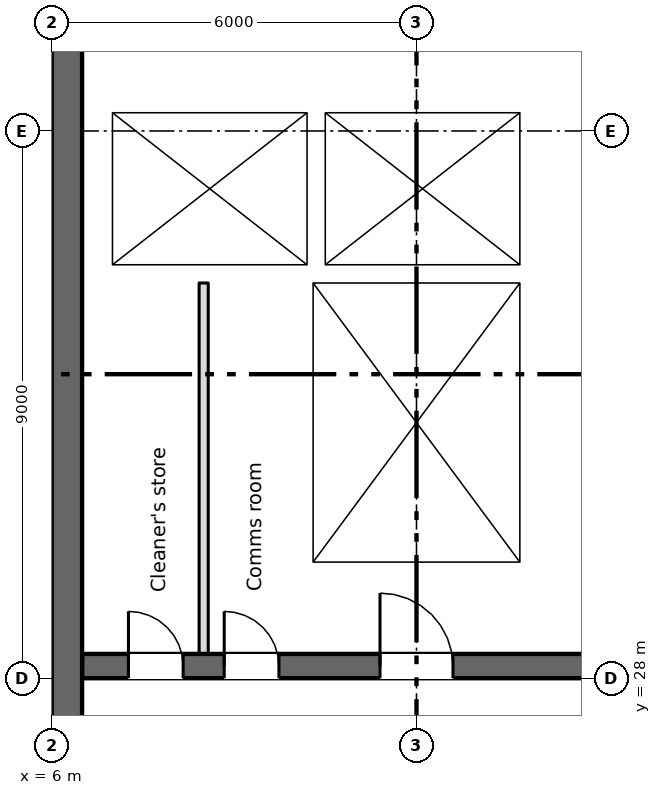
"""IFC4 building model, lengths in metres.
Left out: names, types, materials, properties, quantities, classifications, styles, units other than length and angle.
Written with IfcOpenShell. Run it as: python <this file> out.ifc"""

import sys

from ifc_helpers import new_model, si_unit, direction, frame, frame_2d, origin, place, context, subcontext, project, spatial, rectangle, extrude, element, fill, save


model = new_model("IFC4")
c1 = context("Model", 3, precision=1e-05, world=origin(), true_north=direction((0.0, 1.0)))
c2 = subcontext(c1, "Body", "Model", "MODEL_VIEW")
j1 = project(units=[si_unit("LENGTHUNIT", "METRE"), si_unit("PLANEANGLEUNIT", "RADIAN")], contexts=[c1])
p1 = place(None, origin())
s1 = spatial("IfcSite", under=j1, at=p1, CompositionType="ELEMENT")
p2 = place(p1, origin())
s2 = spatial("IfcBuilding", under=s1, at=p2, CompositionType="ELEMENT")
p3 = place(p2, frame((0.0, 0.0, 258.35)))
s3 = spatial("IfcBuildingStorey", under=s2, at=p3, CompositionType="ELEMENT", Elevation=258.35)
p4 = place(p3, frame((6.25, 8.5, 0.0), z_axis=(0.0, 0.0, 1.0), x_axis=(0.0, 1.0, 0.0)))
e1 = element("IfcWall", 1, at=p4, inside=s3, PredefinedType="SHEAR", context=c2, shape_type="SweptSolid", body=[
    extrude(rectangle(XDim=33.0, YDim=0.5, at=frame_2d((16.5, 0.0))), origin(), (0.0, 0.0, 1.0), 3.4),
])
p5 = place(p4, frame((1.2, 0.0, 0.6)))
e2 = element("IfcOpeningElement", 2, at=p5, cuts=e1, PredefinedType="OPENING", context=c2, shape_type="SweptSolid", body=[
    extrude(rectangle(XDim=0.6, YDim=2.4, at=frame_2d((0.3, 1.2))), frame((0.0, 0.26, 0.0), z_axis=(0.0, -1.0, 0.0), x_axis=(1.0, 0.0, 0.0)), (0.0, 0.0, 1.0), 0.52),
])
p6 = place(p4, frame((7.2, 0.0, 0.6)))
e3 = element("IfcOpeningElement", 3, at=p6, cuts=e1, PredefinedType="OPENING", context=c2, shape_type="SweptSolid", body=[
    extrude(rectangle(XDim=0.6, YDim=2.4, at=frame_2d((0.3, 1.2))), frame((0.0, 0.26, 0.0), z_axis=(0.0, -1.0, 0.0), x_axis=(1.0, 0.0, 0.0)), (0.0, 0.0, 1.0), 0.52),
])
p7 = place(p4, frame((13.2, 0.0, 0.6)))
e4 = element("IfcOpeningElement", 4, at=p7, cuts=e1, PredefinedType="OPENING", context=c2, shape_type="SweptSolid", body=[
    extrude(rectangle(XDim=0.6, YDim=2.4, at=frame_2d((0.3, 1.2))), frame((0.0, 0.26, 0.0), z_axis=(0.0, -1.0, 0.0), x_axis=(1.0, 0.0, 0.0)), (0.0, 0.0, 1.0), 0.52),
])
p8 = place(p3, frame((6.5, 28.2, 0.0), z_axis=(0.0, 0.0, 1.0), x_axis=(1.0, 0.0, 0.0)))
e5 = element("IfcWall", 5, at=p8, inside=s3, PredefinedType="SHEAR", context=c2, shape_type="SweptSolid", body=[
    extrude(rectangle(XDim=58.0, YDim=0.4, at=frame_2d((29.0, 0.0))), origin(), (0.0, 0.0, 1.0), 3.4),
])
p9 = place(p8, frame((12.762, 0.0, 0.0)))
e6 = element("IfcOpeningElement", 6, at=p9, cuts=e5, PredefinedType="OPENING", context=c2, shape_type="SweptSolid", body=[
    extrude(rectangle(XDim=0.9, YDim=2.1, at=frame_2d((0.45, 1.05))), frame((0.0, 0.21, 0.0), z_axis=(0.0, -1.0, 0.0), x_axis=(1.0, 0.0, 0.0)), (0.0, 0.0, 1.0), 0.42),
])
p10 = place(p8, frame((15.337, 0.0, 0.0)))
e7 = element("IfcOpeningElement", 7, at=p10, cuts=e5, PredefinedType="OPENING", context=c2, shape_type="SweptSolid", body=[
    extrude(rectangle(XDim=0.9, YDim=2.1, at=frame_2d((0.45, 1.05))), frame((0.0, 0.21, 0.0), z_axis=(0.0, -1.0, 0.0), x_axis=(1.0, 0.0, 0.0)), (0.0, 0.0, 1.0), 0.42),
])
p11 = place(p8, frame((50.05, 0.0, 0.0)))
e8 = element("IfcOpeningElement", 8, at=p11, cuts=e5, PredefinedType="OPENING", context=c2, shape_type="SweptSolid", body=[
    extrude(rectangle(XDim=0.9, YDim=2.1, at=frame_2d((0.45, 1.05))), frame((0.0, 0.21, 0.0), z_axis=(0.0, -1.0, 0.0), x_axis=(1.0, 0.0, 0.0)), (0.0, 0.0, 1.0), 0.42),
])
p12 = place(p8, frame((0.762, 0.0, 0.0)))
e9 = element("IfcOpeningElement", 9, at=p12, cuts=e5, PredefinedType="OPENING", context=c2, shape_type="SweptSolid", body=[
    extrude(rectangle(XDim=0.9, YDim=2.1, at=frame_2d((0.45, 1.05))), frame((0.0, 0.21, 0.0), z_axis=(0.0, -1.0, 0.0), x_axis=(1.0, 0.0, 0.0)), (0.0, 0.0, 1.0), 0.42),
])
p13 = place(p8, frame((2.337, 0.0, 0.0)))
e10 = element("IfcOpeningElement", 10, at=p13, cuts=e5, PredefinedType="OPENING", context=c2, shape_type="SweptSolid", body=[
    extrude(rectangle(XDim=0.9, YDim=2.1, at=frame_2d((0.45, 1.05))), frame((0.0, 0.21, 0.0), z_axis=(0.0, -1.0, 0.0), x_axis=(1.0, 0.0, 0.0)), (0.0, 0.0, 1.0), 0.42),
])
p14 = place(p8, frame((4.9, 0.0, 0.0)))
e11 = element("IfcOpeningElement", 11, at=p14, cuts=e5, PredefinedType="OPENING", context=c2, shape_type="SweptSolid", body=[
    extrude(rectangle(XDim=1.2, YDim=2.1, at=frame_2d((0.6, 1.05))), frame((0.0, 0.21, 0.0), z_axis=(0.0, -1.0, 0.0), x_axis=(1.0, 0.0, 0.0)), (0.0, 0.0, 1.0), 0.42),
])
p15 = place(p8, frame((31.9, 0.0, 0.0)))
e12 = element("IfcOpeningElement", 12, at=p15, cuts=e5, PredefinedType="OPENING", context=c2, shape_type="SweptSolid", body=[
    extrude(rectangle(XDim=1.2, YDim=2.1, at=frame_2d((0.6, 1.05))), frame((0.0, 0.21, 0.0), z_axis=(0.0, -1.0, 0.0), x_axis=(1.0, 0.0, 0.0)), (0.0, 0.0, 1.0), 0.42),
])
p16 = place(p8, frame((55.4, 0.0, 0.0)))
e13 = element("IfcOpeningElement", 13, at=p16, cuts=e5, PredefinedType="OPENING", context=c2, shape_type="SweptSolid", body=[
    extrude(rectangle(XDim=1.2, YDim=2.1, at=frame_2d((0.6, 1.05))), frame((0.0, 0.21, 0.0), z_axis=(0.0, -1.0, 0.0), x_axis=(1.0, 0.0, 0.0)), (0.0, 0.0, 1.0), 0.42),
])
p17 = place(p8, frame((21.9, 0.0, 0.0)))
e14 = element("IfcOpeningElement", 14, at=p17, cuts=e5, PredefinedType="OPENING", context=c2, shape_type="SweptSolid", body=[
    extrude(rectangle(XDim=1.2, YDim=2.1, at=frame_2d((0.6, 1.05))), frame((0.0, 0.21, 0.0), z_axis=(0.0, -1.0, 0.0), x_axis=(1.0, 0.0, 0.0)), (0.0, 0.0, 1.0), 0.42),
])
p18 = place(p8, frame((41.9, 0.0, 0.0)))
e15 = element("IfcOpeningElement", 15, at=p18, cuts=e5, PredefinedType="OPENING", context=c2, shape_type="SweptSolid", body=[
    extrude(rectangle(XDim=1.2, YDim=2.1, at=frame_2d((0.6, 1.05))), frame((0.0, 0.21, 0.0), z_axis=(0.0, -1.0, 0.0), x_axis=(1.0, 0.0, 0.0)), (0.0, 0.0, 1.0), 0.42),
])
p19 = place(p8, frame((25.05, 0.0, 0.0)))
e16 = element("IfcOpeningElement", 16, at=p19, cuts=e5, PredefinedType="OPENING", context=c2, shape_type="SweptSolid", body=[
    extrude(rectangle(XDim=2.4, YDim=2.1, at=frame_2d((1.2, 1.05))), frame((0.0, 0.21, 0.0), z_axis=(0.0, -1.0, 0.0), x_axis=(1.0, 0.0, 0.0)), (0.0, 0.0, 1.0), 0.42),
])
p20 = place(p8, frame((37.55, 0.0, 0.0)))
e17 = element("IfcOpeningElement", 17, at=p20, cuts=e5, PredefinedType="OPENING", context=c2, shape_type="SweptSolid", body=[
    extrude(rectangle(XDim=2.4, YDim=2.1, at=frame_2d((1.2, 1.05))), frame((0.0, 0.21, 0.0), z_axis=(0.0, -1.0, 0.0), x_axis=(1.0, 0.0, 0.0)), (0.0, 0.0, 1.0), 0.42),
])
p21 = place(p8, frame((8.25, 0.0, 0.0)))
e18 = element("IfcOpeningElement", 18, at=p21, cuts=e5, PredefinedType="OPENING", context=c2, shape_type="SweptSolid", body=[
    extrude(rectangle(XDim=2.4, YDim=2.1, at=frame_2d((1.2, 1.05))), frame((0.0, 0.21, 0.0), z_axis=(0.0, -1.0, 0.0), x_axis=(1.0, 0.0, 0.0)), (0.0, 0.0, 1.0), 0.42),
])
p22 = place(p8, frame((29.05, 0.0, 0.0)))
e19 = element("IfcOpeningElement", 19, at=p22, cuts=e5, PredefinedType="OPENING", context=c2, shape_type="SweptSolid", body=[
    extrude(rectangle(XDim=0.9, YDim=2.1, at=frame_2d((0.45, 1.05))), frame((0.0, 0.21, 0.0), z_axis=(0.0, -1.0, 0.0), x_axis=(1.0, 0.0, 0.0)), (0.0, 0.0, 1.0), 0.42),
])
p23 = place(p8, frame((35.05, 0.0, 0.0)))
e20 = element("IfcOpeningElement", 20, at=p23, cuts=e5, PredefinedType="OPENING", context=c2, shape_type="SweptSolid", body=[
    extrude(rectangle(XDim=0.9, YDim=2.1, at=frame_2d((0.45, 1.05))), frame((0.0, 0.21, 0.0), z_axis=(0.0, -1.0, 0.0), x_axis=(1.0, 0.0, 0.0)), (0.0, 0.0, 1.0), 0.42),
])
p24 = place(p3, frame((6.75, 28.4, 0.0), z_axis=(0.0, 0.0, 1.0), x_axis=(0.0, 1.0, 0.0)))
e21 = element("IfcWall", 21, at=p24, inside=s3, PredefinedType="SHEAR", context=c2, shape_type="SweptSolid", body=[
    extrude(rectangle(XDim=12.85, YDim=0.5, at=frame_2d((6.425, 0.0))), origin(), (0.0, 0.0, 1.0), 3.4),
])
for number, where, z_axis, x_axis in (
    (22, (10.15, 28.4, 0.0), (0.0, 0.0, 1.0), (0.0, 1.0, 0.0)),
    (23, (13.85, 28.4, 0.0), (0.0, 0.0, 1.0), (0.0, 1.0, 0.0)),
):
    element("IfcWall", number, at=place(p3, frame(where, z_axis=z_axis, x_axis=x_axis)), inside=s3, PredefinedType="SHEAR", context=c2, shape_type="SweptSolid", body=[
        extrude(rectangle(XDim=6.1, YDim=0.3, at=frame_2d((3.05, 0.0))), origin(), (0.0, 0.0, 1.0), 3.4),
    ])
p25 = place(p3, frame((7.0, 34.65, 0.0), z_axis=(0.0, 0.0, 1.0), x_axis=(1.0, 0.0, 0.0)))
e24 = element("IfcWall", 24, at=p25, inside=s3, PredefinedType="SHEAR", context=c2, shape_type="SweptSolid", body=[
    extrude(rectangle(XDim=7.0, YDim=0.3, at=frame_2d((3.5, 0.0))), origin(), (0.0, 0.0, 1.0), 3.4),
])
p26 = place(p3, frame((7.0, 37.45, 0.0), z_axis=(0.0, 0.0, 1.0), x_axis=(1.0, 0.0, 0.0)))
e25 = element("IfcWall", 25, at=p26, inside=s3, PredefinedType="SHEAR", context=c2, shape_type="SweptSolid", body=[
    extrude(rectangle(XDim=7.0, YDim=0.3, at=frame_2d((3.5, 0.0))), origin(), (0.0, 0.0, 1.0), 3.4),
])
p27 = place(p26, frame((1.05, 0.0, 0.0)))
e26 = element("IfcOpeningElement", 26, at=p27, cuts=e25, PredefinedType="OPENING", context=c2, shape_type="SweptSolid", body=[
    extrude(rectangle(XDim=1.1, YDim=2.1, at=frame_2d((0.55, 1.05))), frame((0.0, 0.16, 0.0), z_axis=(0.0, -1.0, 0.0), x_axis=(1.0, 0.0, 0.0)), (0.0, 0.0, 1.0), 0.32),
])
p28 = place(p26, frame((4.55, 0.0, 0.0)))
e27 = element("IfcOpeningElement", 27, at=p28, cuts=e25, PredefinedType="OPENING", context=c2, shape_type="SweptSolid", body=[
    extrude(rectangle(XDim=1.1, YDim=2.1, at=frame_2d((0.55, 1.05))), frame((0.0, 0.16, 0.0), z_axis=(0.0, -1.0, 0.0), x_axis=(1.0, 0.0, 0.0)), (0.0, 0.0, 1.0), 0.32),
])
for number, where, z_axis, x_axis in (
    (28, (13.85, 34.8, 0.0), (0.0, 0.0, 1.0), (0.0, 1.0, 0.0)),
    (29, (10.35, 34.8, 0.0), (0.0, 0.0, 1.0), (0.0, 1.0, 0.0)),
):
    element("IfcWall", number, at=place(p3, frame(where, z_axis=z_axis, x_axis=x_axis)), inside=s3, PredefinedType="SHEAR", context=c2, shape_type="SweptSolid", body=[
        extrude(rectangle(XDim=2.5, YDim=0.3, at=frame_2d((1.25, 0.0))), origin(), (0.0, 0.0, 1.0), 3.4),
    ])
p29 = place(p3, frame((8.5, 28.4, 0.0), z_axis=(0.0, 0.0, 1.0), x_axis=(0.0, 1.0, 0.0)))
e30 = element("IfcWall", 30, at=p29, inside=s3, PredefinedType="PARTITIONING", context=c2, shape_type="SweptSolid", body=[
    extrude(rectangle(XDim=6.1, YDim=0.15, at=frame_2d((3.05, 0.0))), origin(), (0.0, 0.0, 1.0), 3.4),
])
p30 = place(p12, origin())
e31 = element("IfcDoor", 31, at=p30, inside=s3, OperationType="SINGLE_SWING_LEFT", PredefinedType="DOOR", context=c2, shape_type="SweptSolid", body=[
    extrude(rectangle(XDim=0.9, YDim=2.1, at=frame_2d((0.45, 1.05))), frame((0.0, 0.025, 0.0), z_axis=(0.0, -1.0, 0.0), x_axis=(1.0, 0.0, 0.0)), (0.0, 0.0, 1.0), 0.05),
])
fill(e9, e31)
p31 = place(p13, origin())
e32 = element("IfcDoor", 32, at=p31, inside=s3, OperationType="SINGLE_SWING_LEFT", PredefinedType="DOOR", context=c2, shape_type="SweptSolid", body=[
    extrude(rectangle(XDim=0.9, YDim=2.1, at=frame_2d((0.45, 1.05))), frame((0.0, 0.025, 0.0), z_axis=(0.0, -1.0, 0.0), x_axis=(1.0, 0.0, 0.0)), (0.0, 0.0, 1.0), 0.05),
])
fill(e10, e32)
p32 = place(p27, origin())
e33 = element("IfcDoor", 33, at=p32, inside=s3, OperationType="SLIDING_TO_LEFT", PredefinedType="DOOR", context=c2, shape_type="SweptSolid", body=[
    extrude(rectangle(XDim=1.1, YDim=2.1, at=frame_2d((0.55, 1.05))), frame((0.0, 0.025, 0.0), z_axis=(0.0, -1.0, 0.0), x_axis=(1.0, 0.0, 0.0)), (0.0, 0.0, 1.0), 0.05),
])
fill(e26, e33)
p33 = place(p28, origin())
e34 = element("IfcDoor", 34, at=p33, inside=s3, OperationType="SLIDING_TO_LEFT", PredefinedType="DOOR", context=c2, shape_type="SweptSolid", body=[
    extrude(rectangle(XDim=1.1, YDim=2.1, at=frame_2d((0.55, 1.05))), frame((0.0, 0.025, 0.0), z_axis=(0.0, -1.0, 0.0), x_axis=(1.0, 0.0, 0.0)), (0.0, 0.0, 1.0), 0.05),
])
fill(e27, e34)
p34 = place(p14, origin())
e35 = element("IfcDoor", 35, at=p34, inside=s3, OperationType="SINGLE_SWING_LEFT", PredefinedType="DOOR", context=c2, shape_type="SweptSolid", body=[
    extrude(rectangle(XDim=1.2, YDim=2.1, at=frame_2d((0.6, 1.05))), frame((0.0, 0.025, 0.0), z_axis=(0.0, -1.0, 0.0), x_axis=(1.0, 0.0, 0.0)), (0.0, 0.0, 1.0), 0.05),
])
fill(e11, e35)
save(model, sys.argv[1])
